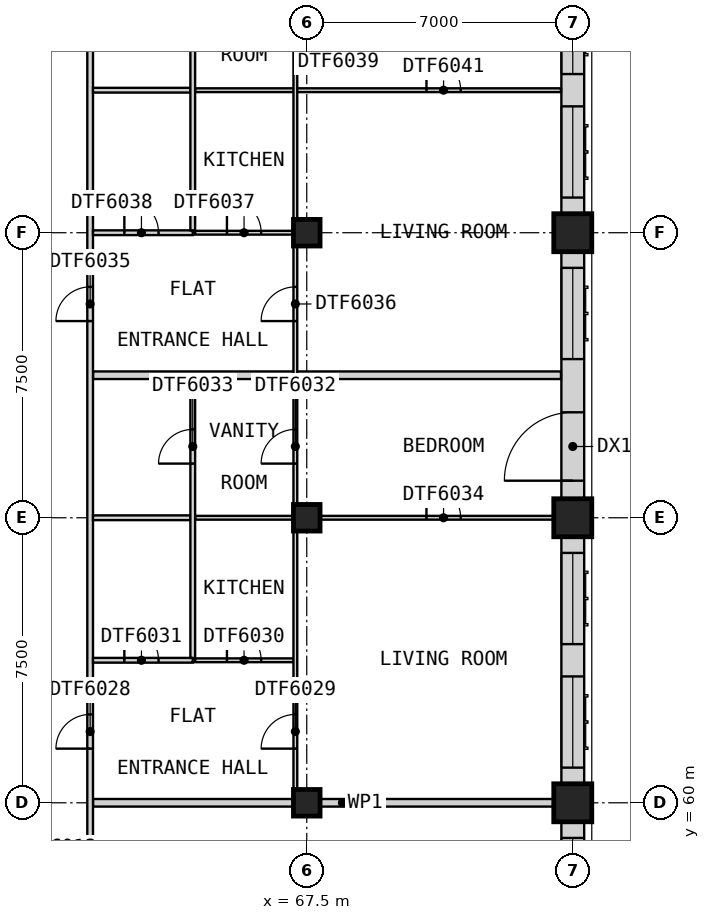
"""IFC4 building model, lengths in metres.
Left out: names, types, materials, properties, quantities, classifications, styles, units other than length and angle.
Written with IfcOpenShell. Run it as: python <this file> out.ifc"""

import sys

from ifc_helpers import new_model, si_unit, direction, frame, frame_2d, origin, origin_2d, place, context, subcontext, project, spatial, rectangle, extrude, element, fill, save


model = new_model("IFC4")
c1 = context("Model", 3, precision=1e-05, world=origin(), true_north=direction((0.0, 1.0)))
c2 = subcontext(c1, "Body", "Model", "MODEL_VIEW")
j1 = project(units=[si_unit("LENGTHUNIT", "METRE"), si_unit("PLANEANGLEUNIT", "RADIAN")], contexts=[c1])
p1 = place(None, origin())
s1 = spatial("IfcSite", under=j1, at=p1, CompositionType="ELEMENT")
p2 = place(p1, origin())
s2 = spatial("IfcBuilding", under=s1, at=p2, CompositionType="ELEMENT")
p3 = place(p2, frame((0.0, 0.0, 266.2)))
s3 = spatial("IfcBuildingStorey", under=s2, at=p3, CompositionType="ELEMENT", Elevation=266.2)
for number, where, z_axis, x_axis in (
    (1, (67.5, 60.0, 0.0), (0.0, 0.0, 1.0), (1.0, 0.0, 0.0)),
    (2, (67.5, 67.5, 0.0), (0.0, 0.0, 1.0), (1.0, 0.0, 0.0)),
    (3, (67.5, 75.0, 0.0), (0.0, 0.0, 1.0), (1.0, 0.0, 0.0)),
):
    element("IfcColumn", number, at=place(p3, frame(where, z_axis=z_axis, x_axis=x_axis)), inside=s3, PredefinedType="COLUMN", context=c2, shape_type="SweptSolid", body=[
        extrude(rectangle(XDim=0.7, YDim=0.7, at=origin_2d()), origin(), (0.0, 0.0, 1.0), 3.5),
    ])
for number, where, z_axis, x_axis in (
    (4, (74.5, 60.0, 0.0), (0.0, 0.0, 1.0), (1.0, 0.0, 0.0)),
    (5, (74.5, 67.5, 0.0), (0.0, 0.0, 1.0), (1.0, 0.0, 0.0)),
    (6, (74.5, 75.0, 0.0), (0.0, 0.0, 1.0), (1.0, 0.0, 0.0)),
):
    element("IfcColumn", number, at=place(p3, frame(where, z_axis=z_axis, x_axis=x_axis)), inside=s3, PredefinedType="COLUMN", context=c2, shape_type="SweptSolid", body=[
        extrude(rectangle(XDim=1.0, YDim=1.0, at=origin_2d()), origin(), (0.0, 0.0, 1.0), 3.5),
    ])
p4 = place(p3, frame((74.5, 53.0, 0.0), z_axis=(0.0, 0.0, 1.0), x_axis=(0.0, 1.0, 0.0)))
e7 = element("IfcWall", 7, at=p4, inside=s3, PredefinedType="SOLIDWALL", context=c2, shape_type="SweptSolid", body=[
    extrude(rectangle(XDim=6.5, YDim=0.6, at=frame_2d((3.25, 0.0))), origin(), (0.0, 0.0, 1.0), 2.75),
])
p5 = place(p4, frame((0.425, 0.0, 0.8)))
e8 = element("IfcOpeningElement", 8, at=p5, cuts=e7, PredefinedType="OPENING", context=c2, shape_type="SweptSolid", body=[
    extrude(rectangle(XDim=2.4, YDim=1.8, at=frame_2d((1.2, 0.9))), frame((0.0, 0.31, 0.0), z_axis=(0.0, -1.0, 0.0), x_axis=(1.0, 0.0, 0.0)), (0.0, 0.0, 1.0), 0.62),
])
p6 = place(p4, frame((3.675, 0.0, 0.8)))
e9 = element("IfcOpeningElement", 9, at=p6, cuts=e7, PredefinedType="OPENING", context=c2, shape_type="SweptSolid", body=[
    extrude(rectangle(XDim=2.4, YDim=1.8, at=frame_2d((1.2, 0.9))), frame((0.0, 0.31, 0.0), z_axis=(0.0, -1.0, 0.0), x_axis=(1.0, 0.0, 0.0)), (0.0, 0.0, 1.0), 0.62),
])
p7 = place(p3, frame((74.5, 60.5, 0.0), z_axis=(0.0, 0.0, 1.0), x_axis=(0.0, 1.0, 0.0)))
e10 = element("IfcWall", 10, at=p7, inside=s3, PredefinedType="SOLIDWALL", context=c2, shape_type="SweptSolid", body=[
    extrude(rectangle(XDim=6.5, YDim=0.6, at=frame_2d((3.25, 0.0))), origin(), (0.0, 0.0, 1.0), 2.75),
])
p8 = place(p7, frame((0.425, 0.0, 0.8)))
e11 = element("IfcOpeningElement", 11, at=p8, cuts=e10, PredefinedType="OPENING", context=c2, shape_type="SweptSolid", body=[
    extrude(rectangle(XDim=2.4, YDim=1.8, at=frame_2d((1.2, 0.9))), frame((0.0, 0.31, 0.0), z_axis=(0.0, -1.0, 0.0), x_axis=(1.0, 0.0, 0.0)), (0.0, 0.0, 1.0), 0.62),
])
p9 = place(p7, frame((3.675, 0.0, 0.8)))
e12 = element("IfcOpeningElement", 12, at=p9, cuts=e10, PredefinedType="OPENING", context=c2, shape_type="SweptSolid", body=[
    extrude(rectangle(XDim=2.4, YDim=1.8, at=frame_2d((1.2, 0.9))), frame((0.0, 0.31, 0.0), z_axis=(0.0, -1.0, 0.0), x_axis=(1.0, 0.0, 0.0)), (0.0, 0.0, 1.0), 0.62),
])
p10 = place(p3, frame((74.5, 68.0, 0.0), z_axis=(0.0, 0.0, 1.0), x_axis=(0.0, 1.0, 0.0)))
e13 = element("IfcWall", 13, at=p10, inside=s3, PredefinedType="SOLIDWALL", context=c2, shape_type="SweptSolid", body=[
    extrude(rectangle(XDim=6.5, YDim=0.6, at=frame_2d((3.25, 0.0))), origin(), (0.0, 0.0, 1.0), 2.75),
])
p11 = place(p10, frame((0.475, 0.0, 0.0)))
e14 = element("IfcOpeningElement", 14, at=p11, cuts=e13, PredefinedType="OPENING", context=c2, shape_type="SweptSolid", body=[
    extrude(rectangle(XDim=1.8, YDim=2.4, at=frame_2d((0.9, 1.2))), frame((0.0, 0.31, 0.0), z_axis=(0.0, -1.0, 0.0), x_axis=(1.0, 0.0, 0.0)), (0.0, 0.0, 1.0), 0.62),
])
p12 = place(p10, frame((3.675, 0.0, 0.8)))
e15 = element("IfcOpeningElement", 15, at=p12, cuts=e13, PredefinedType="OPENING", context=c2, shape_type="SweptSolid", body=[
    extrude(rectangle(XDim=2.4, YDim=1.8, at=frame_2d((1.2, 0.9))), frame((0.0, 0.31, 0.0), z_axis=(0.0, -1.0, 0.0), x_axis=(1.0, 0.0, 0.0)), (0.0, 0.0, 1.0), 0.62),
])
p13 = place(p3, frame((74.5, 75.5, 0.0), z_axis=(0.0, 0.0, 1.0), x_axis=(0.0, 1.0, 0.0)))
e16 = element("IfcWall", 16, at=p13, inside=s3, PredefinedType="SOLIDWALL", context=c2, shape_type="SweptSolid", body=[
    extrude(rectangle(XDim=6.5, YDim=0.6, at=frame_2d((3.25, 0.0))), origin(), (0.0, 0.0, 1.0), 2.75),
])
p14 = place(p13, frame((0.425, 0.0, 0.8)))
e17 = element("IfcOpeningElement", 17, at=p14, cuts=e16, PredefinedType="OPENING", context=c2, shape_type="SweptSolid", body=[
    extrude(rectangle(XDim=2.4, YDim=1.8, at=frame_2d((1.2, 0.9))), frame((0.0, 0.31, 0.0), z_axis=(0.0, -1.0, 0.0), x_axis=(1.0, 0.0, 0.0)), (0.0, 0.0, 1.0), 0.62),
])
p15 = place(p13, frame((3.675, 0.0, 0.8)))
e18 = element("IfcOpeningElement", 18, at=p15, cuts=e16, PredefinedType="OPENING", context=c2, shape_type="SweptSolid", body=[
    extrude(rectangle(XDim=2.4, YDim=1.8, at=frame_2d((1.2, 0.9))), frame((0.0, 0.31, 0.0), z_axis=(0.0, -1.0, 0.0), x_axis=(1.0, 0.0, 0.0)), (0.0, 0.0, 1.0), 0.62),
])
p16 = place(p3, frame((61.875, 60.0, 0.0), z_axis=(0.0, 0.0, 1.0), x_axis=(1.0, 0.0, 0.0)))
e19 = element("IfcWall", 19, at=p16, inside=s3, PredefinedType="PARTITIONING", context=c2, shape_type="SweptSolid", body=[
    extrude(rectangle(XDim=13.125, YDim=0.2, at=frame_2d((6.562, 0.0))), origin(), (0.0, 0.0, 1.0), 3.25),
])
p17 = place(p3, frame((61.875, 71.25, 0.0), z_axis=(0.0, 0.0, 1.0), x_axis=(1.0, 0.0, 0.0)))
e20 = element("IfcWall", 20, at=p17, inside=s3, PredefinedType="PARTITIONING", context=c2, shape_type="SweptSolid", body=[
    extrude(rectangle(XDim=12.315, YDim=0.2, at=frame_2d((6.157, 0.0))), origin(), (0.0, 0.0, 1.0), 3.25),
])
p18 = place(p3, frame((61.8, 58.275, 0.0), z_axis=(0.0, 0.0, 1.0), x_axis=(0.0, 1.0, 0.0)))
e21 = element("IfcWall", 21, at=p18, inside=s3, PredefinedType="PARTITIONING", context=c2, shape_type="SweptSolid", body=[
    extrude(rectangle(XDim=25.95, YDim=0.15, at=frame_2d((12.975, 0.0))), origin(), (0.0, 0.0, 1.0), 3.25),
])
p19 = place(p18, frame((3.15, 0.0, 0.0)))
e22 = element("IfcOpeningElement", 22, at=p19, cuts=e21, PredefinedType="OPENING", context=c2, shape_type="SweptSolid", body=[
    extrude(rectangle(XDim=0.9, YDim=2.1, at=frame_2d((0.45, 1.05))), frame((0.0, 0.085, 0.0), z_axis=(0.0, -1.0, 0.0), x_axis=(1.0, 0.0, 0.0)), (0.0, 0.0, 1.0), 0.17),
])
p20 = place(p18, frame((14.4, 0.0, 0.0)))
e23 = element("IfcOpeningElement", 23, at=p20, cuts=e21, PredefinedType="OPENING", context=c2, shape_type="SweptSolid", body=[
    extrude(rectangle(XDim=0.9, YDim=2.1, at=frame_2d((0.45, 1.05))), frame((0.0, 0.085, 0.0), z_axis=(0.0, -1.0, 0.0), x_axis=(1.0, 0.0, 0.0)), (0.0, 0.0, 1.0), 0.17),
])
p21 = place(p3, frame((64.562, 63.75, 0.0), z_axis=(0.0, 0.0, 1.0), x_axis=(1.0, 0.0, 0.0)))
e24 = element("IfcWall", 24, at=p21, inside=s3, PredefinedType="PARTITIONING", context=c2, shape_type="SweptSolid", body=[
    extrude(rectangle(XDim=2.587, YDim=0.1, at=frame_2d((1.294, 0.0))), origin(), (0.0, 0.0, 1.0), 3.25),
])
p22 = place(p21, frame((0.837, 0.0, 0.0)))
e25 = element("IfcOpeningElement", 25, at=p22, cuts=e24, PredefinedType="OPENING", context=c2, shape_type="SweptSolid", body=[
    extrude(rectangle(XDim=0.9, YDim=2.1, at=frame_2d((0.45, 1.05))), frame((0.0, 0.06, 0.0), z_axis=(0.0, -1.0, 0.0), x_axis=(1.0, 0.0, 0.0)), (0.0, 0.0, 1.0), 0.12),
])
p23 = place(p3, frame((64.562, 67.5, 0.0), z_axis=(0.0, 0.0, 1.0), x_axis=(1.0, 0.0, 0.0)))
e26 = element("IfcWall", 26, at=p23, inside=s3, PredefinedType="PARTITIONING", context=c2, shape_type="SweptSolid", body=[
    extrude(rectangle(XDim=10.438, YDim=0.1, at=frame_2d((5.219, 0.0))), origin(), (0.0, 0.0, 1.0), 3.25),
])
p24 = place(p23, frame((6.087, 0.0, 0.0)))
e27 = element("IfcOpeningElement", 27, at=p24, cuts=e26, PredefinedType="OPENING", context=c2, shape_type="SweptSolid", body=[
    extrude(rectangle(XDim=0.9, YDim=2.1, at=frame_2d((0.45, 1.05))), frame((0.0, 0.06, 0.0), z_axis=(0.0, -1.0, 0.0), x_axis=(1.0, 0.0, 0.0)), (0.0, 0.0, 1.0), 0.12),
])
p25 = place(p3, frame((64.562, 75.0, 0.0), z_axis=(0.0, 0.0, 1.0), x_axis=(1.0, 0.0, 0.0)))
e28 = element("IfcWall", 28, at=p25, inside=s3, PredefinedType="PARTITIONING", context=c2, shape_type="SweptSolid", body=[
    extrude(rectangle(XDim=2.587, YDim=0.1, at=frame_2d((1.294, 0.0))), origin(), (0.0, 0.0, 1.0), 3.25),
])
p26 = place(p25, frame((0.837, 0.0, 0.0)))
e29 = element("IfcOpeningElement", 29, at=p26, cuts=e28, PredefinedType="OPENING", context=c2, shape_type="SweptSolid", body=[
    extrude(rectangle(XDim=0.9, YDim=2.1, at=frame_2d((0.45, 1.05))), frame((0.0, 0.06, 0.0), z_axis=(0.0, -1.0, 0.0), x_axis=(1.0, 0.0, 0.0)), (0.0, 0.0, 1.0), 0.12),
])
p27 = place(p3, frame((64.562, 78.75, 0.0), z_axis=(0.0, 0.0, 1.0), x_axis=(1.0, 0.0, 0.0)))
e30 = element("IfcWall", 30, at=p27, inside=s3, PredefinedType="PARTITIONING", context=c2, shape_type="SweptSolid", body=[
    extrude(rectangle(XDim=9.627, YDim=0.1, at=frame_2d((4.814, 0.0))), origin(), (0.0, 0.0, 1.0), 3.25),
])
p28 = place(p27, frame((6.087, 0.0, 0.0)))
e31 = element("IfcOpeningElement", 31, at=p28, cuts=e30, PredefinedType="OPENING", context=c2, shape_type="SweptSolid", body=[
    extrude(rectangle(XDim=0.9, YDim=2.1, at=frame_2d((0.45, 1.05))), frame((0.0, 0.06, 0.0), z_axis=(0.0, -1.0, 0.0), x_axis=(1.0, 0.0, 0.0)), (0.0, 0.0, 1.0), 0.12),
])
p29 = place(p3, frame((67.2, 60.1, 0.0), z_axis=(0.0, 0.0, 1.0), x_axis=(0.0, 1.0, 0.0)))
e32 = element("IfcWall", 32, at=p29, inside=s3, PredefinedType="PARTITIONING", context=c2, shape_type="SweptSolid", body=[
    extrude(rectangle(XDim=22.3, YDim=0.1, at=frame_2d((11.15, 0.0))), origin(), (0.0, 0.0, 1.0), 3.25),
])
p30 = place(p29, frame((1.325, 0.0, 0.0)))
e33 = element("IfcOpeningElement", 33, at=p30, cuts=e32, PredefinedType="OPENING", context=c2, shape_type="SweptSolid", body=[
    extrude(rectangle(XDim=0.9, YDim=2.1, at=frame_2d((0.45, 1.05))), frame((0.0, 0.06, 0.0), z_axis=(0.0, -1.0, 0.0), x_axis=(1.0, 0.0, 0.0)), (0.0, 0.0, 1.0), 0.12),
])
p31 = place(p29, frame((8.825, 0.0, 0.0)))
e34 = element("IfcOpeningElement", 34, at=p31, cuts=e32, PredefinedType="OPENING", context=c2, shape_type="SweptSolid", body=[
    extrude(rectangle(XDim=0.9, YDim=2.1, at=frame_2d((0.45, 1.05))), frame((0.0, 0.06, 0.0), z_axis=(0.0, -1.0, 0.0), x_axis=(1.0, 0.0, 0.0)), (0.0, 0.0, 1.0), 0.12),
])
p32 = place(p29, frame((12.575, 0.0, 0.0)))
e35 = element("IfcOpeningElement", 35, at=p32, cuts=e32, PredefinedType="OPENING", context=c2, shape_type="SweptSolid", body=[
    extrude(rectangle(XDim=0.9, YDim=2.1, at=frame_2d((0.45, 1.05))), frame((0.0, 0.06, 0.0), z_axis=(0.0, -1.0, 0.0), x_axis=(1.0, 0.0, 0.0)), (0.0, 0.0, 1.0), 0.12),
])
p33 = place(p29, frame((20.075, 0.0, 0.0)))
e36 = element("IfcOpeningElement", 36, at=p33, cuts=e32, PredefinedType="OPENING", context=c2, shape_type="SweptSolid", body=[
    extrude(rectangle(XDim=0.9, YDim=2.1, at=frame_2d((0.45, 1.05))), frame((0.0, 0.06, 0.0), z_axis=(0.0, -1.0, 0.0), x_axis=(1.0, 0.0, 0.0)), (0.0, 0.0, 1.0), 0.12),
])
p34 = place(p3, frame((61.875, 63.75, 0.0), z_axis=(0.0, 0.0, 1.0), x_axis=(1.0, 0.0, 0.0)))
e37 = element("IfcWall", 37, at=p34, inside=s3, PredefinedType="PARTITIONING", context=c2, shape_type="SweptSolid", body=[
    extrude(rectangle(XDim=2.625, YDim=0.125, at=frame_2d((1.312, 0.0))), origin(), (0.0, 0.0, 1.0), 3.25),
])
p35 = place(p34, frame((0.825, 0.0, 0.0)))
e38 = element("IfcOpeningElement", 38, at=p35, cuts=e37, PredefinedType="OPENING", context=c2, shape_type="SweptSolid", body=[
    extrude(rectangle(XDim=0.9, YDim=2.1, at=frame_2d((0.45, 1.05))), frame((0.0, 0.073, 0.0), z_axis=(0.0, -1.0, 0.0), x_axis=(1.0, 0.0, 0.0)), (0.0, 0.0, 1.0), 0.145),
])
p36 = place(p3, frame((61.875, 67.5, 0.0), z_axis=(0.0, 0.0, 1.0), x_axis=(1.0, 0.0, 0.0)))
e39 = element("IfcWall", 39, at=p36, inside=s3, PredefinedType="PARTITIONING", context=c2, shape_type="SweptSolid", body=[
    extrude(rectangle(XDim=2.562, YDim=0.125, at=frame_2d((1.281, 0.0))), origin(), (0.0, 0.0, 1.0), 3.25),
])
p37 = place(p3, frame((61.875, 75.0, 0.0), z_axis=(0.0, 0.0, 1.0), x_axis=(1.0, 0.0, 0.0)))
e40 = element("IfcWall", 40, at=p37, inside=s3, PredefinedType="PARTITIONING", context=c2, shape_type="SweptSolid", body=[
    extrude(rectangle(XDim=2.625, YDim=0.125, at=frame_2d((1.312, 0.0))), origin(), (0.0, 0.0, 1.0), 3.25),
])
p38 = place(p37, frame((0.825, 0.0, 0.0)))
e41 = element("IfcOpeningElement", 41, at=p38, cuts=e40, PredefinedType="OPENING", context=c2, shape_type="SweptSolid", body=[
    extrude(rectangle(XDim=0.9, YDim=2.1, at=frame_2d((0.45, 1.05))), frame((0.0, 0.073, 0.0), z_axis=(0.0, -1.0, 0.0), x_axis=(1.0, 0.0, 0.0)), (0.0, 0.0, 1.0), 0.145),
])
p39 = place(p3, frame((61.875, 78.75, 0.0), z_axis=(0.0, 0.0, 1.0), x_axis=(1.0, 0.0, 0.0)))
e42 = element("IfcWall", 42, at=p39, inside=s3, PredefinedType="PARTITIONING", context=c2, shape_type="SweptSolid", body=[
    extrude(rectangle(XDim=2.562, YDim=0.125, at=frame_2d((1.281, 0.0))), origin(), (0.0, 0.0, 1.0), 3.25),
])
p40 = place(p3, frame((64.5, 63.812, 0.0), z_axis=(0.0, 0.0, 1.0), x_axis=(0.0, 1.0, 0.0)))
e43 = element("IfcWall", 43, at=p40, inside=s3, PredefinedType="PARTITIONING", context=c2, shape_type="SweptSolid", body=[
    extrude(rectangle(XDim=7.337, YDim=0.125, at=frame_2d((3.669, 0.0))), origin(), (0.0, 0.0, 1.0), 3.25),
])
p41 = place(p40, frame((5.113, 0.0, 0.0)))
e44 = element("IfcOpeningElement", 44, at=p41, cuts=e43, PredefinedType="OPENING", context=c2, shape_type="SweptSolid", body=[
    extrude(rectangle(XDim=0.9, YDim=2.1, at=frame_2d((0.45, 1.05))), frame((0.0, 0.073, 0.0), z_axis=(0.0, -1.0, 0.0), x_axis=(1.0, 0.0, 0.0)), (0.0, 0.0, 1.0), 0.145),
])
p42 = place(p3, frame((64.5, 75.062, 0.0), z_axis=(0.0, 0.0, 1.0), x_axis=(0.0, 1.0, 0.0)))
e45 = element("IfcWall", 45, at=p42, inside=s3, PredefinedType="PARTITIONING", context=c2, shape_type="SweptSolid", body=[
    extrude(rectangle(XDim=7.337, YDim=0.125, at=frame_2d((3.669, 0.0))), origin(), (0.0, 0.0, 1.0), 3.25),
])
p43 = place(p42, frame((5.113, 0.0, 0.0)))
e46 = element("IfcOpeningElement", 46, at=p43, cuts=e45, PredefinedType="OPENING", context=c2, shape_type="SweptSolid", body=[
    extrude(rectangle(XDim=0.9, YDim=2.1, at=frame_2d((0.45, 1.05))), frame((0.0, 0.073, 0.0), z_axis=(0.0, -1.0, 0.0), x_axis=(1.0, 0.0, 0.0)), (0.0, 0.0, 1.0), 0.145),
])
p44 = place(p6, origin())
e47 = element("IfcWindow", 47, at=p44, inside=s3, PartitioningType="SINGLE_PANEL", PredefinedType="WINDOW", context=c2, shape_type="SweptSolid", body=[
    extrude(rectangle(XDim=2.4, YDim=1.8, at=frame_2d((1.2, 0.9))), frame((0.0, -0.07, 0.0), z_axis=(0.0, -1.0, 0.0), x_axis=(1.0, 0.0, 0.0)), (0.0, 0.0, 1.0), 0.06),
])
fill(e9, e47)
p45 = place(p8, origin())
e48 = element("IfcWindow", 48, at=p45, inside=s3, PartitioningType="SINGLE_PANEL", PredefinedType="WINDOW", context=c2, shape_type="SweptSolid", body=[
    extrude(rectangle(XDim=2.4, YDim=1.8, at=frame_2d((1.2, 0.9))), frame((0.0, -0.07, 0.0), z_axis=(0.0, -1.0, 0.0), x_axis=(1.0, 0.0, 0.0)), (0.0, 0.0, 1.0), 0.06),
])
fill(e11, e48)
p46 = place(p9, origin())
e49 = element("IfcWindow", 49, at=p46, inside=s3, PartitioningType="SINGLE_PANEL", PredefinedType="WINDOW", context=c2, shape_type="SweptSolid", body=[
    extrude(rectangle(XDim=2.4, YDim=1.8, at=frame_2d((1.2, 0.9))), frame((0.0, -0.07, 0.0), z_axis=(0.0, -1.0, 0.0), x_axis=(1.0, 0.0, 0.0)), (0.0, 0.0, 1.0), 0.06),
])
fill(e12, e49)
p47 = place(p11, origin())
e50 = element("IfcDoor", 50, at=p47, inside=s3, OperationType="SINGLE_SWING_LEFT", PredefinedType="DOOR", context=c2, shape_type="SweptSolid", body=[
    extrude(rectangle(XDim=1.8, YDim=2.4, at=frame_2d((0.9, 1.2))), frame((0.0, -0.075, 0.0), z_axis=(0.0, -1.0, 0.0), x_axis=(1.0, 0.0, 0.0)), (0.0, 0.0, 1.0), 0.05),
])
fill(e14, e50)
p48 = place(p12, origin())
e51 = element("IfcWindow", 51, at=p48, inside=s3, PartitioningType="SINGLE_PANEL", PredefinedType="WINDOW", context=c2, shape_type="SweptSolid", body=[
    extrude(rectangle(XDim=2.4, YDim=1.8, at=frame_2d((1.2, 0.9))), frame((0.0, -0.07, 0.0), z_axis=(0.0, -1.0, 0.0), x_axis=(1.0, 0.0, 0.0)), (0.0, 0.0, 1.0), 0.06),
])
fill(e15, e51)
p49 = place(p14, origin())
e52 = element("IfcWindow", 52, at=p49, inside=s3, PartitioningType="SINGLE_PANEL", PredefinedType="WINDOW", context=c2, shape_type="SweptSolid", body=[
    extrude(rectangle(XDim=2.4, YDim=1.8, at=frame_2d((1.2, 0.9))), frame((0.0, -0.07, 0.0), z_axis=(0.0, -1.0, 0.0), x_axis=(1.0, 0.0, 0.0)), (0.0, 0.0, 1.0), 0.06),
])
fill(e17, e52)
p50 = place(p15, origin())
e53 = element("IfcWindow", 53, at=p50, inside=s3, PartitioningType="SINGLE_PANEL", PredefinedType="WINDOW", context=c2, shape_type="SweptSolid", body=[
    extrude(rectangle(XDim=2.4, YDim=1.8, at=frame_2d((1.2, 0.9))), frame((0.0, -0.07, 0.0), z_axis=(0.0, -1.0, 0.0), x_axis=(1.0, 0.0, 0.0)), (0.0, 0.0, 1.0), 0.06),
])
fill(e18, e53)
p51 = place(p19, origin())
e54 = element("IfcDoor", 54, at=p51, inside=s3, OperationType="SINGLE_SWING_RIGHT", PredefinedType="DOOR", context=c2, shape_type="SweptSolid", body=[
    extrude(rectangle(XDim=0.9, YDim=2.1, at=frame_2d((0.45, 1.05))), frame((0.0, 0.025, 0.0), z_axis=(0.0, -1.0, 0.0), x_axis=(1.0, 0.0, 0.0)), (0.0, 0.0, 1.0), 0.05),
])
fill(e22, e54)
p52 = place(p30, origin())
e55 = element("IfcDoor", 55, at=p52, inside=s3, OperationType="SINGLE_SWING_LEFT", PredefinedType="DOOR", context=c2, shape_type="SweptSolid", body=[
    extrude(rectangle(XDim=0.9, YDim=2.1, at=frame_2d((0.45, 1.05))), frame((0.0, 0.025, 0.0), z_axis=(0.0, -1.0, 0.0), x_axis=(1.0, 0.0, 0.0)), (0.0, 0.0, 1.0), 0.05),
])
fill(e33, e55)
p53 = place(p22, origin())
e56 = element("IfcDoor", 56, at=p53, inside=s3, OperationType="SINGLE_SWING_LEFT", PredefinedType="DOOR", context=c2, shape_type="SweptSolid", body=[
    extrude(rectangle(XDim=0.9, YDim=2.1, at=frame_2d((0.45, 1.05))), frame((0.0, 0.025, 0.0), z_axis=(0.0, -1.0, 0.0), x_axis=(1.0, 0.0, 0.0)), (0.0, 0.0, 1.0), 0.05),
])
fill(e25, e56)
p54 = place(p35, origin())
e57 = element("IfcDoor", 57, at=p54, inside=s3, OperationType="SINGLE_SWING_LEFT", PredefinedType="DOOR", context=c2, shape_type="SweptSolid", body=[
    extrude(rectangle(XDim=0.9, YDim=2.1, at=frame_2d((0.45, 1.05))), frame((0.0, 0.025, 0.0), z_axis=(0.0, -1.0, 0.0), x_axis=(1.0, 0.0, 0.0)), (0.0, 0.0, 1.0), 0.05),
])
fill(e38, e57)
p55 = place(p31, origin())
e58 = element("IfcDoor", 58, at=p55, inside=s3, OperationType="SINGLE_SWING_LEFT", PredefinedType="DOOR", context=c2, shape_type="SweptSolid", body=[
    extrude(rectangle(XDim=0.9, YDim=2.1, at=frame_2d((0.45, 1.05))), frame((0.0, 0.025, 0.0), z_axis=(0.0, -1.0, 0.0), x_axis=(1.0, 0.0, 0.0)), (0.0, 0.0, 1.0), 0.05),
])
fill(e34, e58)
p56 = place(p41, origin())
e59 = element("IfcDoor", 59, at=p56, inside=s3, OperationType="SINGLE_SWING_LEFT", PredefinedType="DOOR", context=c2, shape_type="SweptSolid", body=[
    extrude(rectangle(XDim=0.9, YDim=2.1, at=frame_2d((0.45, 1.05))), frame((0.0, 0.025, 0.0), z_axis=(0.0, -1.0, 0.0), x_axis=(1.0, 0.0, 0.0)), (0.0, 0.0, 1.0), 0.05),
])
fill(e44, e59)
p57 = place(p24, origin())
e60 = element("IfcDoor", 60, at=p57, inside=s3, OperationType="SINGLE_SWING_RIGHT", PredefinedType="DOOR", context=c2, shape_type="SweptSolid", body=[
    extrude(rectangle(XDim=0.9, YDim=2.1, at=frame_2d((0.45, 1.05))), frame((0.0, 0.025, 0.0), z_axis=(0.0, -1.0, 0.0), x_axis=(1.0, 0.0, 0.0)), (0.0, 0.0, 1.0), 0.05),
])
fill(e27, e60)
p58 = place(p20, origin())
e61 = element("IfcDoor", 61, at=p58, inside=s3, OperationType="SINGLE_SWING_RIGHT", PredefinedType="DOOR", context=c2, shape_type="SweptSolid", body=[
    extrude(rectangle(XDim=0.9, YDim=2.1, at=frame_2d((0.45, 1.05))), frame((0.0, 0.025, 0.0), z_axis=(0.0, -1.0, 0.0), x_axis=(1.0, 0.0, 0.0)), (0.0, 0.0, 1.0), 0.05),
])
fill(e23, e61)
p59 = place(p32, origin())
e62 = element("IfcDoor", 62, at=p59, inside=s3, OperationType="SINGLE_SWING_LEFT", PredefinedType="DOOR", context=c2, shape_type="SweptSolid", body=[
    extrude(rectangle(XDim=0.9, YDim=2.1, at=frame_2d((0.45, 1.05))), frame((0.0, 0.025, 0.0), z_axis=(0.0, -1.0, 0.0), x_axis=(1.0, 0.0, 0.0)), (0.0, 0.0, 1.0), 0.05),
])
fill(e35, e62)
p60 = place(p26, origin())
e63 = element("IfcDoor", 63, at=p60, inside=s3, OperationType="SINGLE_SWING_LEFT", PredefinedType="DOOR", context=c2, shape_type="SweptSolid", body=[
    extrude(rectangle(XDim=0.9, YDim=2.1, at=frame_2d((0.45, 1.05))), frame((0.0, 0.025, 0.0), z_axis=(0.0, -1.0, 0.0), x_axis=(1.0, 0.0, 0.0)), (0.0, 0.0, 1.0), 0.05),
])
fill(e29, e63)
p61 = place(p38, origin())
e64 = element("IfcDoor", 64, at=p61, inside=s3, OperationType="SINGLE_SWING_LEFT", PredefinedType="DOOR", context=c2, shape_type="SweptSolid", body=[
    extrude(rectangle(XDim=0.9, YDim=2.1, at=frame_2d((0.45, 1.05))), frame((0.0, 0.025, 0.0), z_axis=(0.0, -1.0, 0.0), x_axis=(1.0, 0.0, 0.0)), (0.0, 0.0, 1.0), 0.05),
])
fill(e41, e64)
p62 = place(p28, origin())
e65 = element("IfcDoor", 65, at=p62, inside=s3, OperationType="SINGLE_SWING_RIGHT", PredefinedType="DOOR", context=c2, shape_type="SweptSolid", body=[
    extrude(rectangle(XDim=0.9, YDim=2.1, at=frame_2d((0.45, 1.05))), frame((0.0, 0.025, 0.0), z_axis=(0.0, -1.0, 0.0), x_axis=(1.0, 0.0, 0.0)), (0.0, 0.0, 1.0), 0.05),
])
fill(e31, e65)
save(model, sys.argv[1])
